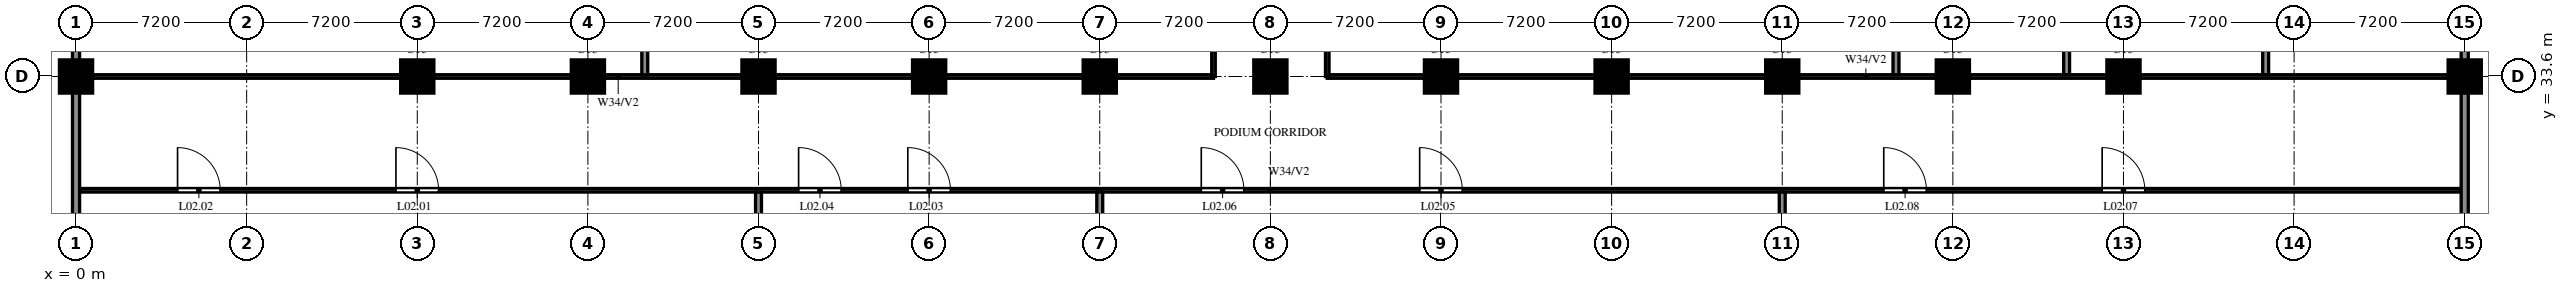
"""IFC4 building model, lengths in metres.
Left out: names, types, materials, properties, quantities, classifications, styles, units other than length and angle.
Written with IfcOpenShell. Run it as: python <this file> out.ifc"""

import sys

from ifc_helpers import new_model, si_unit, direction, frame, frame_2d, origin, origin_2d, place, context, subcontext, project, spatial, rectangle, circle, extrude, source, transform, mapped, element, fill, save


model = new_model("IFC4")
c1 = context("Model", 3, precision=1e-05, world=origin(), true_north=direction((0.0, 1.0)))
c2 = subcontext(c1, "Body", "Model", "MODEL_VIEW")
j1 = project(units=[si_unit("LENGTHUNIT", "METRE"), si_unit("PLANEANGLEUNIT", "RADIAN")], contexts=[c1])
p1 = place(None, origin())
s1 = spatial("IfcSite", under=j1, at=p1, CompositionType="ELEMENT")
p2 = place(p1, origin())
s2 = spatial("IfcBuilding", under=s1, at=p2, CompositionType="ELEMENT")
p3 = place(p2, frame((0.0, 0.0, 13.2)))
s3 = spatial("IfcBuildingStorey", under=s2, at=p3, CompositionType="ELEMENT", Elevation=13.2)
m1 = source(origin(), c2, "Body", "SweptSolid", [
    extrude(circle(Radius=0.7, at=origin_2d()), origin(), (0.0, 0.0, 1.0), 3.8),
])
for number, where, z_axis, x_axis in (
    (1, (0.0, 33.6, 0.0), (0.0, 0.0, 1.0), (1.0, 0.0, 0.0)),
    (2, (14.4, 33.6, 0.0), (0.0, 0.0, 1.0), (1.0, 0.0, 0.0)),
    (3, (21.6, 33.6, 0.0), (0.0, 0.0, 1.0), (1.0, 0.0, 0.0)),
    (4, (28.8, 33.6, 0.0), (0.0, 0.0, 1.0), (1.0, 0.0, 0.0)),
    (5, (36.0, 33.6, 0.0), (0.0, 0.0, 1.0), (1.0, 0.0, 0.0)),
    (6, (43.2, 33.6, 0.0), (0.0, 0.0, 1.0), (1.0, 0.0, 0.0)),
    (7, (50.4, 33.6, 0.0), (0.0, 0.0, 1.0), (1.0, 0.0, 0.0)),
    (8, (57.6, 33.6, 0.0), (0.0, 0.0, 1.0), (1.0, 0.0, 0.0)),
    (9, (64.8, 33.6, 0.0), (0.0, 0.0, 1.0), (1.0, 0.0, 0.0)),
    (10, (72.0, 33.6, 0.0), (0.0, 0.0, 1.0), (1.0, 0.0, 0.0)),
    (11, (79.2, 33.6, 0.0), (0.0, 0.0, 1.0), (1.0, 0.0, 0.0)),
    (12, (86.4, 33.6, 0.0), (0.0, 0.0, 1.0), (1.0, 0.0, 0.0)),
    (13, (100.8, 33.6, 0.0), (0.0, 0.0, 1.0), (1.0, 0.0, 0.0)),
):
    element("IfcColumn", number, at=place(p3, frame(where, z_axis=z_axis, x_axis=x_axis)), inside=s3, PredefinedType="COLUMN", context=c2, shape_type="MappedRepresentation", body=[
        mapped(m1, transform((0.0, 0.0, 0.0))),
    ])
p4 = place(p3, frame((0.15, 28.8, 0.0), z_axis=(0.0, 0.0, 1.0), x_axis=(1.0, 0.0, 0.0)))
e14 = element("IfcWall", 14, at=p4, inside=s3, PredefinedType="PARTITIONING", context=c2, shape_type="SweptSolid", body=[
    extrude(rectangle(XDim=100.5, YDim=0.15, at=frame_2d((50.25, 0.0))), origin(), (0.0, 0.0, 1.0), 2.6),
])
p5 = place(p4, frame((13.35, 0.0, 0.0)))
e15 = element("IfcOpeningElement", 15, at=p5, cuts=e14, PredefinedType="OPENING", context=c2, shape_type="SweptSolid", body=[
    extrude(rectangle(XDim=1.8, YDim=2.1, at=frame_2d((0.9, 1.05))), frame((0.0, 0.085, 0.0), z_axis=(0.0, -1.0, 0.0), x_axis=(1.0, 0.0, 0.0)), (0.0, 0.0, 1.0), 0.17),
])
p6 = place(p4, frame((4.134, 0.0, 0.0)))
e16 = element("IfcOpeningElement", 16, at=p6, cuts=e14, PredefinedType="OPENING", context=c2, shape_type="SweptSolid", body=[
    extrude(rectangle(XDim=1.8, YDim=2.1, at=frame_2d((0.9, 1.05))), frame((0.0, 0.085, 0.0), z_axis=(0.0, -1.0, 0.0), x_axis=(1.0, 0.0, 0.0)), (0.0, 0.0, 1.0), 0.17),
])
p7 = place(p4, frame((34.95, 0.0, 0.0)))
e17 = element("IfcOpeningElement", 17, at=p7, cuts=e14, PredefinedType="OPENING", context=c2, shape_type="SweptSolid", body=[
    extrude(rectangle(XDim=1.8, YDim=2.1, at=frame_2d((0.9, 1.05))), frame((0.0, 0.085, 0.0), z_axis=(0.0, -1.0, 0.0), x_axis=(1.0, 0.0, 0.0)), (0.0, 0.0, 1.0), 0.17),
])
p8 = place(p4, frame((30.342, 0.0, 0.0)))
e18 = element("IfcOpeningElement", 18, at=p8, cuts=e14, PredefinedType="OPENING", context=c2, shape_type="SweptSolid", body=[
    extrude(rectangle(XDim=1.8, YDim=2.1, at=frame_2d((0.9, 1.05))), frame((0.0, 0.085, 0.0), z_axis=(0.0, -1.0, 0.0), x_axis=(1.0, 0.0, 0.0)), (0.0, 0.0, 1.0), 0.17),
])
p9 = place(p4, frame((56.55, 0.0, 0.0)))
e19 = element("IfcOpeningElement", 19, at=p9, cuts=e14, PredefinedType="OPENING", context=c2, shape_type="SweptSolid", body=[
    extrude(rectangle(XDim=1.8, YDim=2.1, at=frame_2d((0.9, 1.05))), frame((0.0, 0.085, 0.0), z_axis=(0.0, -1.0, 0.0), x_axis=(1.0, 0.0, 0.0)), (0.0, 0.0, 1.0), 0.17),
])
p10 = place(p4, frame((47.334, 0.0, 0.0)))
e20 = element("IfcOpeningElement", 20, at=p10, cuts=e14, PredefinedType="OPENING", context=c2, shape_type="SweptSolid", body=[
    extrude(rectangle(XDim=1.8, YDim=2.1, at=frame_2d((0.9, 1.05))), frame((0.0, 0.085, 0.0), z_axis=(0.0, -1.0, 0.0), x_axis=(1.0, 0.0, 0.0)), (0.0, 0.0, 1.0), 0.17),
])
p11 = place(p4, frame((85.35, 0.0, 0.0)))
e21 = element("IfcOpeningElement", 21, at=p11, cuts=e14, PredefinedType="OPENING", context=c2, shape_type="SweptSolid", body=[
    extrude(rectangle(XDim=1.8, YDim=2.1, at=frame_2d((0.9, 1.05))), frame((0.0, 0.085, 0.0), z_axis=(0.0, -1.0, 0.0), x_axis=(1.0, 0.0, 0.0)), (0.0, 0.0, 1.0), 0.17),
])
p12 = place(p4, frame((76.134, 0.0, 0.0)))
e22 = element("IfcOpeningElement", 22, at=p12, cuts=e14, PredefinedType="OPENING", context=c2, shape_type="SweptSolid", body=[
    extrude(rectangle(XDim=1.8, YDim=2.1, at=frame_2d((0.9, 1.05))), frame((0.0, 0.085, 0.0), z_axis=(0.0, -1.0, 0.0), x_axis=(1.0, 0.0, 0.0)), (0.0, 0.0, 1.0), 0.17),
])
p13 = place(p3, frame((0.15, 33.6, 0.0), z_axis=(0.0, 0.0, 1.0), x_axis=(1.0, 0.0, 0.0)))
e23 = element("IfcWall", 23, at=p13, inside=s3, PredefinedType="PARTITIONING", context=c2, shape_type="SweptSolid", body=[
    extrude(rectangle(XDim=47.85, YDim=0.15, at=frame_2d((23.925, 0.0))), origin(), (0.0, 0.0, 1.0), 2.6),
])
p14 = place(p3, frame((52.8, 33.6, 0.0), z_axis=(0.0, 0.0, 1.0), x_axis=(1.0, 0.0, 0.0)))
e24 = element("IfcWall", 24, at=p14, inside=s3, PredefinedType="PARTITIONING", context=c2, shape_type="SweptSolid", body=[
    extrude(rectangle(XDim=47.85, YDim=0.15, at=frame_2d((23.925, 0.0))), origin(), (0.0, 0.0, 1.0), 2.6),
])
p15 = place(p3, frame((0.0, 9.6, 0.0), z_axis=(0.0, 0.0, 1.0), x_axis=(0.0, 1.0, 0.0)))
e25 = element("IfcWall", 25, at=p15, inside=s3, PredefinedType="SOLIDWALL", context=c2, shape_type="SweptSolid", body=[
    extrude(rectangle(XDim=33.3, YDim=0.3, at=frame_2d((16.65, 0.0))), origin(), (0.0, 0.0, 1.0), 3.8),
])
p16 = place(p15, frame((1.05, 0.0, 0.6)))
e26 = element("IfcOpeningElement", 26, at=p16, cuts=e25, PredefinedType="OPENING", context=c2, shape_type="SweptSolid", body=[
    extrude(rectangle(XDim=1.8, YDim=2.4, at=frame_2d((0.9, 1.2))), frame((0.0, 0.16, 0.0), z_axis=(0.0, -1.0, 0.0), x_axis=(1.0, 0.0, 0.0)), (0.0, 0.0, 1.0), 0.32),
])
p17 = place(p15, frame((4.65, 0.0, 0.6)))
e27 = element("IfcOpeningElement", 27, at=p17, cuts=e25, PredefinedType="OPENING", context=c2, shape_type="SweptSolid", body=[
    extrude(rectangle(XDim=1.8, YDim=2.4, at=frame_2d((0.9, 1.2))), frame((0.0, 0.16, 0.0), z_axis=(0.0, -1.0, 0.0), x_axis=(1.0, 0.0, 0.0)), (0.0, 0.0, 1.0), 0.32),
])
p18 = place(p15, frame((11.85, 0.0, 0.6)))
e28 = element("IfcOpeningElement", 28, at=p18, cuts=e25, PredefinedType="OPENING", context=c2, shape_type="SweptSolid", body=[
    extrude(rectangle(XDim=1.8, YDim=2.4, at=frame_2d((0.9, 1.2))), frame((0.0, 0.16, 0.0), z_axis=(0.0, -1.0, 0.0), x_axis=(1.0, 0.0, 0.0)), (0.0, 0.0, 1.0), 0.32),
])
p19 = place(p15, frame((15.45, 0.0, 0.6)))
e29 = element("IfcOpeningElement", 29, at=p19, cuts=e25, PredefinedType="OPENING", context=c2, shape_type="SweptSolid", body=[
    extrude(rectangle(XDim=1.8, YDim=2.4, at=frame_2d((0.9, 1.2))), frame((0.0, 0.16, 0.0), z_axis=(0.0, -1.0, 0.0), x_axis=(1.0, 0.0, 0.0)), (0.0, 0.0, 1.0), 0.32),
])
p20 = place(p15, frame((26.25, 0.0, 0.6)))
e30 = element("IfcOpeningElement", 30, at=p20, cuts=e25, PredefinedType="OPENING", context=c2, shape_type="SweptSolid", body=[
    extrude(rectangle(XDim=1.8, YDim=2.4, at=frame_2d((0.9, 1.2))), frame((0.0, 0.16, 0.0), z_axis=(0.0, -1.0, 0.0), x_axis=(1.0, 0.0, 0.0)), (0.0, 0.0, 1.0), 0.32),
])
p21 = place(p15, frame((29.85, 0.0, 0.6)))
e31 = element("IfcOpeningElement", 31, at=p21, cuts=e25, PredefinedType="OPENING", context=c2, shape_type="SweptSolid", body=[
    extrude(rectangle(XDim=1.8, YDim=2.4, at=frame_2d((0.9, 1.2))), frame((0.0, 0.16, 0.0), z_axis=(0.0, -1.0, 0.0), x_axis=(1.0, 0.0, 0.0)), (0.0, 0.0, 1.0), 0.32),
])
p22 = place(p3, frame((24.0, 33.675, 0.0), z_axis=(0.0, 0.0, 1.0), x_axis=(0.0, 1.0, 0.0)))
e32 = element("IfcWall", 32, at=p22, inside=s3, PredefinedType="SOLIDWALL", context=c2, shape_type="SweptSolid", body=[
    extrude(rectangle(XDim=15.75, YDim=0.25, at=frame_2d((7.875, 0.0))), origin(), (0.0, 0.0, 1.0), 2.9),
])
for number, where, z_axis, x_axis in (
    (33, (28.8, 9.75, 0.0), (0.0, 0.0, 1.0), (0.0, 1.0, 0.0)),
    (34, (43.2, 9.75, 0.0), (0.0, 0.0, 1.0), (0.0, 1.0, 0.0)),
):
    element("IfcWall", number, at=place(p3, frame(where, z_axis=z_axis, x_axis=x_axis)), inside=s3, PredefinedType="SOLIDWALL", context=c2, shape_type="SweptSolid", body=[
        extrude(rectangle(XDim=18.975, YDim=0.25, at=frame_2d((9.488, 0.0))), origin(), (0.0, 0.0, 1.0), 2.6),
    ])
for number, where, z_axis, x_axis in (
    (35, (48.0, 33.6, 0.0), (0.0, 0.0, 1.0), (0.0, 1.0, 0.0)),
    (36, (52.8, 33.6, 0.0), (0.0, 0.0, 1.0), (0.0, 1.0, 0.0)),
):
    element("IfcWall", number, at=place(p3, frame(where, z_axis=z_axis, x_axis=x_axis)), inside=s3, PredefinedType="PARTITIONING", context=c2, shape_type="SweptSolid", body=[
        extrude(rectangle(XDim=15.9, YDim=0.15, at=frame_2d((7.95, 0.0))), origin(), (0.0, 0.0, 1.0), 2.9),
    ])
p23 = place(p3, frame((72.0, 9.75, 0.0), z_axis=(0.0, 0.0, 1.0), x_axis=(0.0, 1.0, 0.0)))
e37 = element("IfcWall", 37, at=p23, inside=s3, PredefinedType="SOLIDWALL", context=c2, shape_type="SweptSolid", body=[
    extrude(rectangle(XDim=18.975, YDim=0.25, at=frame_2d((9.488, 0.0))), origin(), (0.0, 0.0, 1.0), 2.6),
])
for number, where, z_axis, x_axis in (
    (38, (76.8, 33.675, 0.0), (0.0, 0.0, 1.0), (0.0, 1.0, 0.0)),
    (39, (84.0, 33.675, 0.0), (0.0, 0.0, 1.0), (0.0, 1.0, 0.0)),
):
    element("IfcWall", number, at=place(p3, frame(where, z_axis=z_axis, x_axis=x_axis)), inside=s3, PredefinedType="SOLIDWALL", context=c2, shape_type="SweptSolid", body=[
        extrude(rectangle(XDim=15.75, YDim=0.25, at=frame_2d((7.875, 0.0))), origin(), (0.0, 0.0, 1.0), 2.9),
    ])
p24 = place(p3, frame((92.4, 33.675, 0.0), z_axis=(0.0, 0.0, 1.0), x_axis=(0.0, 1.0, 0.0)))
e40 = element("IfcWall", 40, at=p24, inside=s3, PredefinedType="SOLIDWALL", context=c2, shape_type="SweptSolid", body=[
    extrude(rectangle(XDim=15.75, YDim=0.25, at=frame_2d((7.875, 0.0))), origin(), (0.0, 0.0, 1.0), 3.8),
])
p25 = place(p3, frame((100.8, 9.6, 0.0), z_axis=(0.0, 0.0, 1.0), x_axis=(0.0, 1.0, 0.0)))
e41 = element("IfcWall", 41, at=p25, inside=s3, PredefinedType="SOLIDWALL", context=c2, shape_type="SweptSolid", body=[
    extrude(rectangle(XDim=33.3, YDim=0.3, at=frame_2d((16.65, 0.0))), origin(), (0.0, 0.0, 1.0), 3.8),
])
p26 = place(p25, frame((1.05, 0.0, 0.6)))
e42 = element("IfcOpeningElement", 42, at=p26, cuts=e41, PredefinedType="OPENING", context=c2, shape_type="SweptSolid", body=[
    extrude(rectangle(XDim=1.8, YDim=2.4, at=frame_2d((0.9, 1.2))), frame((0.0, 0.16, 0.0), z_axis=(0.0, -1.0, 0.0), x_axis=(1.0, 0.0, 0.0)), (0.0, 0.0, 1.0), 0.32),
])
p27 = place(p25, frame((4.65, 0.0, 0.6)))
e43 = element("IfcOpeningElement", 43, at=p27, cuts=e41, PredefinedType="OPENING", context=c2, shape_type="SweptSolid", body=[
    extrude(rectangle(XDim=1.8, YDim=2.4, at=frame_2d((0.9, 1.2))), frame((0.0, 0.16, 0.0), z_axis=(0.0, -1.0, 0.0), x_axis=(1.0, 0.0, 0.0)), (0.0, 0.0, 1.0), 0.32),
])
p28 = place(p25, frame((11.85, 0.0, 0.6)))
e44 = element("IfcOpeningElement", 44, at=p28, cuts=e41, PredefinedType="OPENING", context=c2, shape_type="SweptSolid", body=[
    extrude(rectangle(XDim=1.8, YDim=2.4, at=frame_2d((0.9, 1.2))), frame((0.0, 0.16, 0.0), z_axis=(0.0, -1.0, 0.0), x_axis=(1.0, 0.0, 0.0)), (0.0, 0.0, 1.0), 0.32),
])
p29 = place(p25, frame((15.45, 0.0, 0.6)))
e45 = element("IfcOpeningElement", 45, at=p29, cuts=e41, PredefinedType="OPENING", context=c2, shape_type="SweptSolid", body=[
    extrude(rectangle(XDim=1.8, YDim=2.4, at=frame_2d((0.9, 1.2))), frame((0.0, 0.16, 0.0), z_axis=(0.0, -1.0, 0.0), x_axis=(1.0, 0.0, 0.0)), (0.0, 0.0, 1.0), 0.32),
])
p30 = place(p25, frame((26.25, 0.0, 0.6)))
e46 = element("IfcOpeningElement", 46, at=p30, cuts=e41, PredefinedType="OPENING", context=c2, shape_type="SweptSolid", body=[
    extrude(rectangle(XDim=1.8, YDim=2.4, at=frame_2d((0.9, 1.2))), frame((0.0, 0.16, 0.0), z_axis=(0.0, -1.0, 0.0), x_axis=(1.0, 0.0, 0.0)), (0.0, 0.0, 1.0), 0.32),
])
p31 = place(p25, frame((29.85, 0.0, 0.6)))
e47 = element("IfcOpeningElement", 47, at=p31, cuts=e41, PredefinedType="OPENING", context=c2, shape_type="SweptSolid", body=[
    extrude(rectangle(XDim=1.8, YDim=2.4, at=frame_2d((0.9, 1.2))), frame((0.0, 0.16, 0.0), z_axis=(0.0, -1.0, 0.0), x_axis=(1.0, 0.0, 0.0)), (0.0, 0.0, 1.0), 0.32),
])
p32 = place(p5, origin())
e48 = element("IfcDoor", 48, at=p32, inside=s3, OperationType="DOUBLE_DOOR_SINGLE_SWING", PredefinedType="DOOR", context=c2, shape_type="SweptSolid", body=[
    extrude(rectangle(XDim=1.8, YDim=2.1, at=frame_2d((0.9, 1.05))), frame((0.0, 0.025, 0.0), z_axis=(0.0, -1.0, 0.0), x_axis=(1.0, 0.0, 0.0)), (0.0, 0.0, 1.0), 0.05),
])
fill(e15, e48)
p33 = place(p6, origin())
e49 = element("IfcDoor", 49, at=p33, inside=s3, OperationType="DOUBLE_DOOR_SINGLE_SWING", PredefinedType="DOOR", context=c2, shape_type="SweptSolid", body=[
    extrude(rectangle(XDim=1.8, YDim=2.1, at=frame_2d((0.9, 1.05))), frame((0.0, 0.025, 0.0), z_axis=(0.0, -1.0, 0.0), x_axis=(1.0, 0.0, 0.0)), (0.0, 0.0, 1.0), 0.05),
])
fill(e16, e49)
p34 = place(p7, origin())
e50 = element("IfcDoor", 50, at=p34, inside=s3, OperationType="DOUBLE_DOOR_SINGLE_SWING", PredefinedType="DOOR", context=c2, shape_type="SweptSolid", body=[
    extrude(rectangle(XDim=1.8, YDim=2.1, at=frame_2d((0.9, 1.05))), frame((0.0, 0.025, 0.0), z_axis=(0.0, -1.0, 0.0), x_axis=(1.0, 0.0, 0.0)), (0.0, 0.0, 1.0), 0.05),
])
fill(e17, e50)
p35 = place(p8, origin())
e51 = element("IfcDoor", 51, at=p35, inside=s3, OperationType="DOUBLE_DOOR_SINGLE_SWING", PredefinedType="DOOR", context=c2, shape_type="SweptSolid", body=[
    extrude(rectangle(XDim=1.8, YDim=2.1, at=frame_2d((0.9, 1.05))), frame((0.0, 0.025, 0.0), z_axis=(0.0, -1.0, 0.0), x_axis=(1.0, 0.0, 0.0)), (0.0, 0.0, 1.0), 0.05),
])
fill(e18, e51)
p36 = place(p9, origin())
e52 = element("IfcDoor", 52, at=p36, inside=s3, OperationType="DOUBLE_DOOR_SINGLE_SWING", PredefinedType="DOOR", context=c2, shape_type="SweptSolid", body=[
    extrude(rectangle(XDim=1.8, YDim=2.1, at=frame_2d((0.9, 1.05))), frame((0.0, 0.025, 0.0), z_axis=(0.0, -1.0, 0.0), x_axis=(1.0, 0.0, 0.0)), (0.0, 0.0, 1.0), 0.05),
])
fill(e19, e52)
p37 = place(p10, origin())
e53 = element("IfcDoor", 53, at=p37, inside=s3, OperationType="DOUBLE_DOOR_SINGLE_SWING", PredefinedType="DOOR", context=c2, shape_type="SweptSolid", body=[
    extrude(rectangle(XDim=1.8, YDim=2.1, at=frame_2d((0.9, 1.05))), frame((0.0, 0.025, 0.0), z_axis=(0.0, -1.0, 0.0), x_axis=(1.0, 0.0, 0.0)), (0.0, 0.0, 1.0), 0.05),
])
fill(e20, e53)
p38 = place(p11, origin())
e54 = element("IfcDoor", 54, at=p38, inside=s3, OperationType="DOUBLE_DOOR_SINGLE_SWING", PredefinedType="DOOR", context=c2, shape_type="SweptSolid", body=[
    extrude(rectangle(XDim=1.8, YDim=2.1, at=frame_2d((0.9, 1.05))), frame((0.0, 0.025, 0.0), z_axis=(0.0, -1.0, 0.0), x_axis=(1.0, 0.0, 0.0)), (0.0, 0.0, 1.0), 0.05),
])
fill(e21, e54)
p39 = place(p12, origin())
e55 = element("IfcDoor", 55, at=p39, inside=s3, OperationType="DOUBLE_DOOR_SINGLE_SWING", PredefinedType="DOOR", context=c2, shape_type="SweptSolid", body=[
    extrude(rectangle(XDim=1.8, YDim=2.1, at=frame_2d((0.9, 1.05))), frame((0.0, 0.025, 0.0), z_axis=(0.0, -1.0, 0.0), x_axis=(1.0, 0.0, 0.0)), (0.0, 0.0, 1.0), 0.05),
])
fill(e22, e55)
save(model, sys.argv[1])
